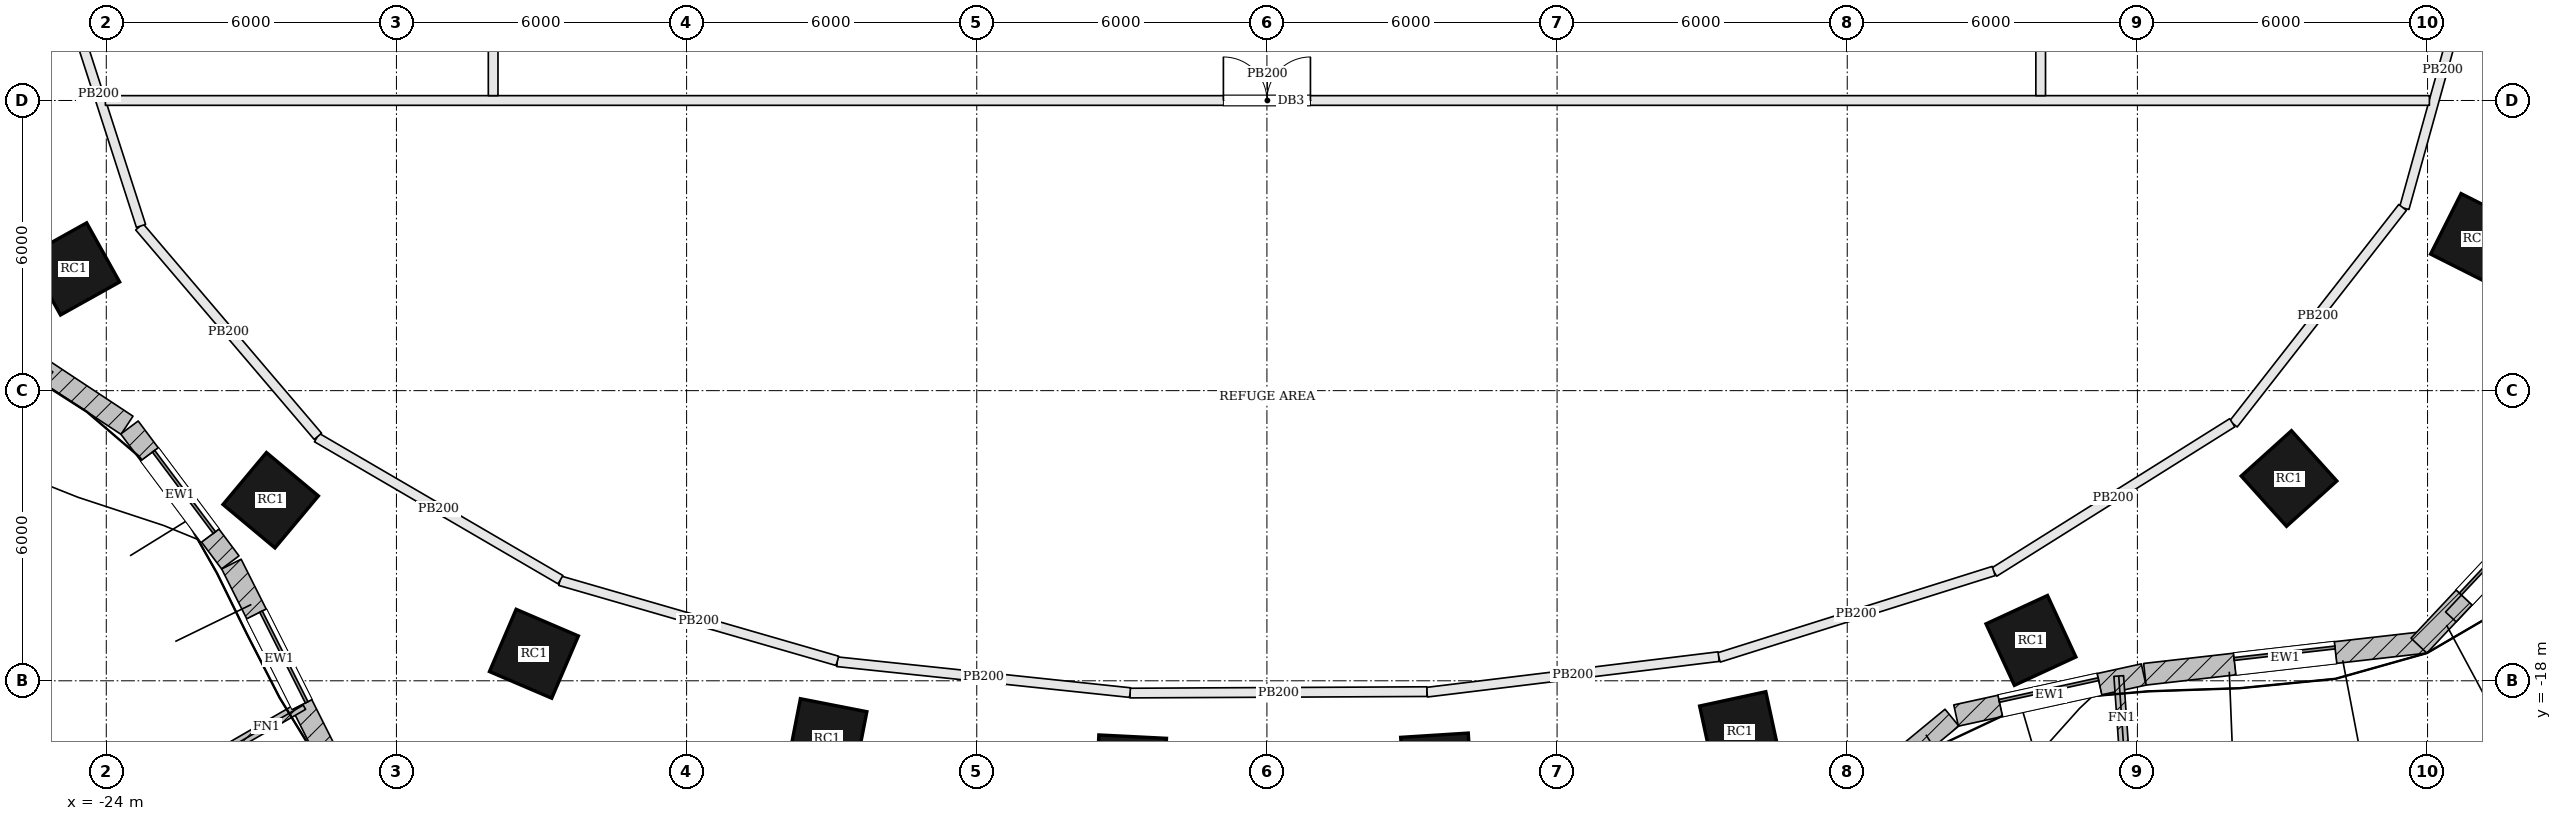
"""IFC4 building model, lengths in metres.
Left out: names, types, materials, properties, quantities, classifications, styles, units other than length and angle.
Written with IfcOpenShell. Run it as: python <this file> out.ifc"""

import sys

from ifc_helpers import new_model, si_unit, direction, frame, frame_2d, origin, origin_2d, place, context, subcontext, project, spatial, rectangle, extrude, element, fill, save


model = new_model("IFC4")
c1 = context("Model", 3, precision=1e-05, world=origin(), true_north=direction((0.0, 1.0)))
c2 = subcontext(c1, "Body", "Model", "MODEL_VIEW")
j1 = project(units=[si_unit("LENGTHUNIT", "METRE"), si_unit("PLANEANGLEUNIT", "RADIAN")], contexts=[c1])
p1 = place(None, origin())
s1 = spatial("IfcSite", under=j1, at=p1, CompositionType="ELEMENT")
p2 = place(p1, origin())
s2 = spatial("IfcBuilding", under=s1, at=p2, CompositionType="ELEMENT")
p3 = place(p2, frame((0.0, 0.0, 55.5)))
s3 = spatial("IfcBuildingStorey", under=s2, at=p3, CompositionType="ELEMENT", Elevation=55.5)
for number, where, z_axis, x_axis in (
    (1, (-24.676, -9.483, 0.0), (0.0, 0.0, 1.0), (0.487, -0.873, 0.0)),
    (2, (-20.6, -14.266, 0.0), (0.0, 0.0, 1.0), (0.767, -0.641, 0.0)),
    (3, (-15.157, -17.441, 0.0), (0.0, 0.0, 1.0), (0.919, -0.394, 0.0)),
    (4, (-9.094, -19.192, 0.0), (0.0, 0.0, 1.0), (0.981, -0.192, 0.0)),
    (5, (-2.811, -19.854, 0.0), (0.0, 0.0, 1.0), (0.999, -0.05, 0.0)),
    (6, (3.509, -19.824, 0.0), (0.0, 0.0, 1.0), (0.998, 0.063, 0.0)),
    (7, (9.78, -19.058, 0.0), (0.0, 0.0, 1.0), (0.977, 0.211, 0.0)),
    (8, (15.799, -17.165, 0.0), (0.0, 0.0, 1.0), (0.908, 0.419, 0.0)),
    (9, (21.135, -13.817, 0.0), (0.0, 0.0, 1.0), (0.743, 0.67, 0.0)),
    (10, (25.003, -8.866, 0.0), (0.0, 0.0, 1.0), (0.45, 0.893, 0.0)),
):
    element("IfcColumn", number, at=place(p3, frame(where, z_axis=z_axis, x_axis=x_axis)), inside=s3, PredefinedType="COLUMN", context=c2, shape_type="SweptSolid", body=[
        extrude(rectangle(XDim=1.4, YDim=1.4, at=origin_2d()), origin(), (0.0, 0.0, 1.0), 3.6),
    ])
p4 = place(p3, frame((-28.853, -9.227, 0.0), z_axis=(0.0, 0.0, 1.0), x_axis=(0.834404370393, -0.551152743502, 0.0)))
e11 = element("IfcWall", 11, at=p4, inside=s3, PredefinedType="SOLIDWALL", context=c2, shape_type="SweptSolid", body=[
    extrude(rectangle(XDim=6.33, YDim=0.45, at=frame_2d((3.165, 0.0))), origin(), (0.0, 0.0, 1.0), 3.4),
])
p5 = place(p4, frame((2.115, 0.0, 0.9)))
e12 = element("IfcOpeningElement", 12, at=p5, cuts=e11, PredefinedType="OPENING", context=c2, shape_type="SweptSolid", body=[
    extrude(rectangle(XDim=2.1, YDim=2.0, at=frame_2d((1.05, 1.0))), frame((0.0, 0.235, 0.0), z_axis=(0.0, -1.0, 0.0), x_axis=(1.0, 0.0, 0.0)), (0.0, 0.0, 1.0), 0.47),
])
p6 = place(p3, frame((-23.52, -12.762, 0.0), z_axis=(0.0, 0.0, 1.0), x_axis=(0.598664281495, -0.801000048728, 0.0)))
e13 = element("IfcWall", 13, at=p6, inside=s3, PredefinedType="SOLIDWALL", context=c2, shape_type="SweptSolid", body=[
    extrude(rectangle(XDim=3.482, YDim=0.45, at=frame_2d((1.741, 0.0))), origin(), (0.0, 0.0, 1.0), 3.4),
])
p7 = place(p6, frame((0.691, 0.0, 0.9)))
e14 = element("IfcOpeningElement", 14, at=p7, cuts=e13, PredefinedType="OPENING", context=c2, shape_type="SweptSolid", body=[
    extrude(rectangle(XDim=2.1, YDim=2.0, at=frame_2d((1.05, 1.0))), frame((0.0, 0.235, 0.0), z_axis=(0.0, -1.0, 0.0), x_axis=(1.0, 0.0, 0.0)), (0.0, 0.0, 1.0), 0.47),
])
p8 = place(p3, frame((-21.413, -15.586, 0.0), z_axis=(0.0, 0.0, 1.0), x_axis=(0.449428064685, -0.893316525467, 0.0)))
e15 = element("IfcWall", 15, at=p8, inside=s3, PredefinedType="SOLIDWALL", context=c2, shape_type="SweptSolid", body=[
    extrude(rectangle(XDim=4.407, YDim=0.45, at=frame_2d((2.204, 0.0))), origin(), (0.0, 0.0, 1.0), 3.4),
])
p9 = place(p8, frame((1.154, 0.0, 0.9)))
e16 = element("IfcOpeningElement", 16, at=p9, cuts=e15, PredefinedType="OPENING", context=c2, shape_type="SweptSolid", body=[
    extrude(rectangle(XDim=2.1, YDim=2.0, at=frame_2d((1.05, 1.0))), frame((0.0, 0.235, 0.0), z_axis=(0.0, -1.0, 0.0), x_axis=(1.0, 0.0, 0.0)), (0.0, 0.0, 1.0), 0.47),
])
p10 = place(p3, frame((10.879, -21.473, 0.0), z_axis=(0.0, 0.0, 1.0), x_axis=(0.77124668946, 0.636536365023, 0.0)))
e17 = element("IfcWall", 17, at=p10, inside=s3, PredefinedType="SOLIDWALL", context=c2, shape_type="SweptSolid", body=[
    extrude(rectangle(XDim=4.261, YDim=0.45, at=frame_2d((2.13, 0.0))), origin(), (0.0, 0.0, 1.0), 3.4),
])
p11 = place(p10, frame((1.08, 0.0, 0.9)))
e18 = element("IfcOpeningElement", 18, at=p11, cuts=e17, PredefinedType="OPENING", context=c2, shape_type="SweptSolid", body=[
    extrude(rectangle(XDim=2.1, YDim=2.0, at=frame_2d((1.05, 1.0))), frame((0.0, 0.235, 0.0), z_axis=(0.0, -1.0, 0.0), x_axis=(1.0, 0.0, 0.0)), (0.0, 0.0, 1.0), 0.47),
])
p12 = place(p3, frame((14.251, -18.718, 0.0), z_axis=(0.0, 0.0, 1.0), x_axis=(0.976903627618, 0.213680374267, 0.0)))
e19 = element("IfcWall", 19, at=p12, inside=s3, PredefinedType="SOLIDWALL", context=c2, shape_type="SweptSolid", body=[
    extrude(rectangle(XDim=3.97, YDim=0.45, at=frame_2d((1.985, 0.0))), origin(), (0.0, 0.0, 1.0), 3.4),
])
p13 = place(p12, frame((0.935, 0.0, 0.9)))
e20 = element("IfcOpeningElement", 20, at=p13, cuts=e19, PredefinedType="OPENING", context=c2, shape_type="SweptSolid", body=[
    extrude(rectangle(XDim=2.1, YDim=2.0, at=frame_2d((1.05, 1.0))), frame((0.0, 0.235, 0.0), z_axis=(0.0, -1.0, 0.0), x_axis=(1.0, 0.0, 0.0)), (0.0, 0.0, 1.0), 0.47),
])
p14 = place(p3, frame((18.154, -17.865, 0.0), z_axis=(0.0, 0.0, 1.0), x_axis=(0.993572909097, 0.113193967633, 0.0)))
e21 = element("IfcWall", 21, at=p14, inside=s3, PredefinedType="SOLIDWALL", context=c2, shape_type="SweptSolid", body=[
    extrude(rectangle(XDim=5.839, YDim=0.45, at=frame_2d((2.919, 0.0))), origin(), (0.0, 0.0, 1.0), 3.4),
])
p15 = place(p14, frame((1.869, 0.0, 0.9)))
e22 = element("IfcOpeningElement", 22, at=p15, cuts=e21, PredefinedType="OPENING", context=c2, shape_type="SweptSolid", body=[
    extrude(rectangle(XDim=2.1, YDim=2.0, at=frame_2d((1.05, 1.0))), frame((0.0, 0.235, 0.0), z_axis=(0.0, -1.0, 0.0), x_axis=(1.0, 0.0, 0.0)), (0.0, 0.0, 1.0), 0.47),
])
p16 = place(p3, frame((23.822, -17.273, 0.0), z_axis=(0.0, 0.0, 1.0), x_axis=(0.684173167988, 0.729319598122, 0.0)))
e23 = element("IfcWall", 23, at=p16, inside=s3, PredefinedType="SOLIDWALL", context=c2, shape_type="SweptSolid", body=[
    extrude(rectangle(XDim=4.829, YDim=0.45, at=frame_2d((2.415, 0.0))), origin(), (0.0, 0.0, 1.0), 3.4),
])
p17 = place(p16, frame((1.365, 0.0, 0.9)))
e24 = element("IfcOpeningElement", 24, at=p17, cuts=e23, PredefinedType="OPENING", context=c2, shape_type="SweptSolid", body=[
    extrude(rectangle(XDim=2.1, YDim=2.0, at=frame_2d((1.05, 1.0))), frame((0.0, 0.235, 0.0), z_axis=(0.0, -1.0, 0.0), x_axis=(1.0, 0.0, 0.0)), (0.0, 0.0, 1.0), 0.47),
])
for number, where, z_axis, x_axis in (
    (25, (-19.928, -18.504, 0.0), (0.0, 0.0, 1.0), (-0.866, -0.5, 0.0)),
    (26, (17.614, -17.901, 0.0), (0.0, 0.0, 1.0), (0.07, -0.998, 0.0)),
):
    element("IfcWall", number, at=place(p3, frame(where, z_axis=z_axis, x_axis=x_axis)), inside=s3, PredefinedType="SOLIDWALL", context=c2, shape_type="SweptSolid", body=[
        extrude(rectangle(XDim=1.75, YDim=0.2, at=frame_2d((0.875, 0.0))), origin(), (0.0, 0.0, 1.0), 3.4),
    ])
p18 = place(p3, frame((-28.807, -9.347, 3.6), z_axis=(0.0, 0.0, 1.0), x_axis=(0.834398186729, -0.551162104995, 0.0)))
e27 = element("IfcWall", 27, at=p18, inside=s3, PredefinedType="PARAPET", context=c2, shape_type="SweptSolid", body=[
    extrude(rectangle(XDim=4.337, YDim=0.3, at=frame_2d((2.169, 0.0))), origin(), (0.0, 0.0, 1.0), 1.1),
])
p19 = place(p3, frame((24.481, -16.68, 3.6), z_axis=(0.0, 0.0, 1.0), x_axis=(0.684154586848, 0.729337028606, 0.0)))
e28 = element("IfcWall", 28, at=p19, inside=s3, PredefinedType="PARAPET", context=c2, shape_type="SweptSolid", body=[
    extrude(rectangle(XDim=3.804, YDim=0.3, at=frame_2d((1.902, 0.0))), origin(), (0.0, 0.0, 1.0), 1.1),
])
p20 = place(p3, frame((25.108, -2.504, 0.0), z_axis=(0.0, 0.0, 1.0), x_axis=(-0.267461570452, -0.963568528093, 0.0)))
e29 = element("IfcWall", 29, at=p20, inside=s3, PredefinedType="PARTITIONING", context=c2, shape_type="SweptSolid", body=[
    extrude(rectangle(XDim=5.94, YDim=0.2, at=frame_2d((2.97, 0.0))), origin(), (0.0, 0.0, 1.0), 3.4),
])
p21 = place(p3, frame((23.484, -8.211, 0.0), z_axis=(0.0, 0.0, 1.0), x_axis=(-0.61559569305, -0.788062143932, 0.0)))
e30 = element("IfcWall", 30, at=p21, inside=s3, PredefinedType="PARTITIONING", context=c2, shape_type="SweptSolid", body=[
    extrude(rectangle(XDim=5.684, YDim=0.2, at=frame_2d((2.842, 0.0))), origin(), (0.0, 0.0, 1.0), 3.4),
])
p22 = place(p3, frame((19.962, -12.664, 0.0), z_axis=(0.0, 0.0, 1.0), x_axis=(-0.847109868331, -0.531417793243, 0.0)))
e31 = element("IfcWall", 31, at=p22, inside=s3, PredefinedType="PARTITIONING", context=c2, shape_type="SweptSolid", body=[
    extrude(rectangle(XDim=5.812, YDim=0.2, at=frame_2d((2.906, 0.0))), origin(), (0.0, 0.0, 1.0), 3.4),
])
p23 = place(p3, frame((15.028, -15.73, 0.0), z_axis=(0.0, 0.0, 1.0), x_axis=(-0.953899230101, -0.300127071108, 0.0)))
e32 = element("IfcWall", 32, at=p23, inside=s3, PredefinedType="PARTITIONING", context=c2, shape_type="SweptSolid", body=[
    extrude(rectangle(XDim=5.958, YDim=0.2, at=frame_2d((2.979, 0.0))), origin(), (0.0, 0.0, 1.0), 3.4),
])
p24 = place(p3, frame((9.341, -17.5, 0.0), z_axis=(0.0, 0.0, 1.0), x_axis=(-0.992636454539, -0.121131618992, 0.0)))
e33 = element("IfcWall", 33, at=p24, inside=s3, PredefinedType="PARTITIONING", context=c2, shape_type="SweptSolid", body=[
    extrude(rectangle(XDim=6.077, YDim=0.2, at=frame_2d((3.038, 0.0))), origin(), (0.0, 0.0, 1.0), 3.4),
])
p25 = place(p3, frame((3.308, -18.224, 0.0), z_axis=(0.0, 0.0, 1.0), x_axis=(-0.999988230875, -0.004851609169, 0.0)))
e34 = element("IfcWall", 34, at=p25, inside=s3, PredefinedType="PARTITIONING", context=c2, shape_type="SweptSolid", body=[
    extrude(rectangle(XDim=6.139, YDim=0.2, at=frame_2d((3.07, 0.0))), origin(), (0.0, 0.0, 1.0), 3.4),
])
p26 = place(p3, frame((-2.83, -18.244, 0.0), z_axis=(0.0, 0.0, 1.0), x_axis=(-0.994495561058, 0.10477871461, 0.0)))
e35 = element("IfcWall", 35, at=p26, inside=s3, PredefinedType="PARTITIONING", context=c2, shape_type="SweptSolid", body=[
    extrude(rectangle(XDim=6.088, YDim=0.2, at=frame_2d((3.044, 0.0))), origin(), (0.0, 0.0, 1.0), 3.4),
])
p27 = place(p3, frame((-8.882, -17.588, 0.0), z_axis=(0.0, 0.0, 1.0), x_axis=(-0.960715878889, 0.277533781818, 0.0)))
e36 = element("IfcWall", 36, at=p27, inside=s3, PredefinedType="PARTITIONING", context=c2, shape_type="SweptSolid", body=[
    extrude(rectangle(XDim=5.97, YDim=0.2, at=frame_2d((2.985, 0.0))), origin(), (0.0, 0.0, 1.0), 3.4),
])
p28 = place(p3, frame((-14.608, -15.909, 0.0), z_axis=(0.0, 0.0, 1.0), x_axis=(-0.863803195861, 0.503829374709, 0.0)))
e37 = element("IfcWall", 37, at=p28, inside=s3, PredefinedType="PARTITIONING", context=c2, shape_type="SweptSolid", body=[
    extrude(rectangle(XDim=5.831, YDim=0.2, at=frame_2d((2.916, 0.0))), origin(), (0.0, 0.0, 1.0), 3.4),
])
p29 = place(p3, frame((-19.624, -12.945, 0.0), z_axis=(0.0, 0.0, 1.0), x_axis=(-0.648549295441, 0.761172655435, 0.0)))
e38 = element("IfcWall", 38, at=p29, inside=s3, PredefinedType="PARTITIONING", context=c2, shape_type="SweptSolid", body=[
    extrude(rectangle(XDim=5.693, YDim=0.2, at=frame_2d((2.846, 0.0))), origin(), (0.0, 0.0, 1.0), 3.4),
])
p30 = place(p3, frame((-23.282, -8.593, 0.0), z_axis=(0.0, 0.0, 1.0), x_axis=(-0.307048901132, 0.951693738717, 0.0)))
e39 = element("IfcWall", 39, at=p30, inside=s3, PredefinedType="PARTITIONING", context=c2, shape_type="SweptSolid", body=[
    extrude(rectangle(XDim=5.722, YDim=0.2, at=frame_2d((2.861, 0.0))), origin(), (0.0, 0.0, 1.0), 3.4),
])
p31 = place(p3, frame((-24.018, -6.0, 0.0), z_axis=(0.0, 0.0, 1.0), x_axis=(1.0, 0.0, 0.0)))
e40 = element("IfcWall", 40, at=p31, inside=s3, PredefinedType="PARTITIONING", context=c2, shape_type="SweptSolid", body=[
    extrude(rectangle(XDim=48.056, YDim=0.2, at=frame_2d((24.028, 0.0))), origin(), (0.0, 0.0, 1.0), 3.4),
])
p32 = place(p31, frame((23.118, 0.0, 0.0)))
e41 = element("IfcOpeningElement", 41, at=p32, cuts=e40, PredefinedType="OPENING", context=c2, shape_type="SweptSolid", body=[
    extrude(rectangle(XDim=1.8, YDim=2.1, at=frame_2d((0.9, 1.05))), frame((0.0, 0.11, 0.0), z_axis=(0.0, -1.0, 0.0), x_axis=(1.0, 0.0, 0.0)), (0.0, 0.0, 1.0), 0.22),
])
p33 = place(p3, frame((-16.0, 14.9, 0.0), z_axis=(0.0, 0.0, 1.0), x_axis=(0.0, -1.0, 0.0)))
e42 = element("IfcWall", 42, at=p33, inside=s3, PredefinedType="PARTITIONING", context=c2, shape_type="SweptSolid", body=[
    extrude(rectangle(XDim=20.8, YDim=0.2, at=frame_2d((10.4, 0.0))), origin(), (0.0, 0.0, 1.0), 3.4),
])
p34 = place(p33, frame((9.5, 0.0, 0.0)))
e43 = element("IfcOpeningElement", 43, at=p34, cuts=e42, PredefinedType="OPENING", context=c2, shape_type="SweptSolid", body=[
    extrude(rectangle(XDim=1.8, YDim=2.1, at=frame_2d((0.9, 1.05))), frame((0.0, 0.11, 0.0), z_axis=(0.0, -1.0, 0.0), x_axis=(1.0, 0.0, 0.0)), (0.0, 0.0, 1.0), 0.22),
])
p35 = place(p3, frame((16.0, -5.9, 0.0), z_axis=(0.0, 0.0, 1.0), x_axis=(0.0, 1.0, 0.0)))
e44 = element("IfcWall", 44, at=p35, inside=s3, PredefinedType="PARTITIONING", context=c2, shape_type="SweptSolid", body=[
    extrude(rectangle(XDim=20.8, YDim=0.2, at=frame_2d((10.4, 0.0))), origin(), (0.0, 0.0, 1.0), 3.4),
])
p36 = place(p35, frame((9.5, 0.0, 0.0)))
e45 = element("IfcOpeningElement", 45, at=p36, cuts=e44, PredefinedType="OPENING", context=c2, shape_type="SweptSolid", body=[
    extrude(rectangle(XDim=1.8, YDim=2.1, at=frame_2d((0.9, 1.05))), frame((0.0, 0.11, 0.0), z_axis=(0.0, -1.0, 0.0), x_axis=(1.0, 0.0, 0.0)), (0.0, 0.0, 1.0), 0.22),
])
p37 = place(p7, origin())
e46 = element("IfcWindow", 46, at=p37, inside=s3, PartitioningType="SINGLE_PANEL", PredefinedType="WINDOW", context=c2, shape_type="SweptSolid", body=[
    extrude(rectangle(XDim=2.1, YDim=2.0, at=frame_2d((1.05, 1.0))), frame((0.0, 0.135, 0.0), z_axis=(0.0, -1.0, 0.0), x_axis=(1.0, 0.0, 0.0)), (0.0, 0.0, 1.0), 0.06),
])
fill(e14, e46)
p38 = place(p9, origin())
e47 = element("IfcWindow", 47, at=p38, inside=s3, PartitioningType="SINGLE_PANEL", PredefinedType="WINDOW", context=c2, shape_type="SweptSolid", body=[
    extrude(rectangle(XDim=2.1, YDim=2.0, at=frame_2d((1.05, 1.0))), frame((0.0, 0.135, 0.0), z_axis=(0.0, -1.0, 0.0), x_axis=(1.0, 0.0, 0.0)), (0.0, 0.0, 1.0), 0.06),
])
fill(e16, e47)
p39 = place(p13, origin())
e48 = element("IfcWindow", 48, at=p39, inside=s3, PartitioningType="SINGLE_PANEL", PredefinedType="WINDOW", context=c2, shape_type="SweptSolid", body=[
    extrude(rectangle(XDim=2.1, YDim=2.0, at=frame_2d((1.05, 1.0))), frame((0.0, 0.135, 0.0), z_axis=(0.0, -1.0, 0.0), x_axis=(1.0, 0.0, 0.0)), (0.0, 0.0, 1.0), 0.06),
])
fill(e20, e48)
p40 = place(p15, origin())
e49 = element("IfcWindow", 49, at=p40, inside=s3, PartitioningType="SINGLE_PANEL", PredefinedType="WINDOW", context=c2, shape_type="SweptSolid", body=[
    extrude(rectangle(XDim=2.1, YDim=2.0, at=frame_2d((1.05, 1.0))), frame((0.0, 0.135, 0.0), z_axis=(0.0, -1.0, 0.0), x_axis=(1.0, 0.0, 0.0)), (0.0, 0.0, 1.0), 0.06),
])
fill(e22, e49)
p41 = place(p17, origin())
e50 = element("IfcWindow", 50, at=p41, inside=s3, PartitioningType="SINGLE_PANEL", PredefinedType="WINDOW", context=c2, shape_type="SweptSolid", body=[
    extrude(rectangle(XDim=2.1, YDim=2.0, at=frame_2d((1.05, 1.0))), frame((0.0, 0.135, 0.0), z_axis=(0.0, -1.0, 0.0), x_axis=(1.0, 0.0, 0.0)), (0.0, 0.0, 1.0), 0.06),
])
fill(e24, e50)
p42 = place(p32, origin())
e51 = element("IfcDoor", 51, at=p42, inside=s3, OperationType="DOUBLE_DOOR_SINGLE_SWING", PredefinedType="DOOR", context=c2, shape_type="SweptSolid", body=[
    extrude(rectangle(XDim=1.8, YDim=2.1, at=frame_2d((0.9, 1.05))), frame((0.0, 0.025, 0.0), z_axis=(0.0, -1.0, 0.0), x_axis=(1.0, 0.0, 0.0)), (0.0, 0.0, 1.0), 0.05),
])
fill(e41, e51)
save(model, sys.argv[1])
